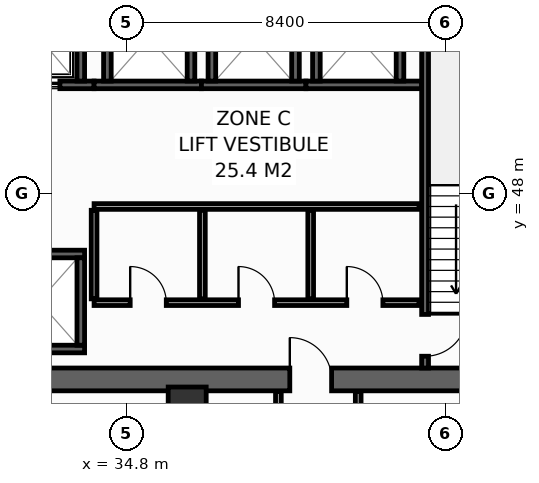
"""IFC4 building model, lengths in metres.
Left out: names, types, materials, properties, quantities, classifications, styles, units other than length and angle.
Written with IfcOpenShell. Run it as: python <this file> out.ifc"""

import sys

from ifc_helpers import new_model, si_unit, direction, frame, frame_2d, origin, origin_2d, place, context, subcontext, project, spatial, rectangle, hollow_rectangle, extrude, element, fill, save


model = new_model("IFC4")
c1 = context("Model", 3, precision=1e-05, world=origin(), true_north=direction((0.0, 1.0)))
c2 = subcontext(c1, "Body", "Model", "MODEL_VIEW")
j1 = project(units=[si_unit("LENGTHUNIT", "METRE"), si_unit("PLANEANGLEUNIT", "RADIAN")], contexts=[c1])
p1 = place(None, origin())
s1 = spatial("IfcSite", under=j1, at=p1, CompositionType="ELEMENT")
p2 = place(p1, origin())
s2 = spatial("IfcBuilding", under=s1, at=p2, CompositionType="ELEMENT")
p3 = place(p2, frame((0.0, 0.0, 106.0)))
s3 = spatial("IfcBuildingStorey", under=s2, at=p3, CompositionType="ELEMENT", Elevation=106.0)
p4 = place(p3, frame((13.5, 43.1, 0.0), z_axis=(0.0, 0.0, 1.0), x_axis=(1.0, 0.0, 0.0)))
e1 = element("IfcWall", 1, at=p4, inside=s3, PredefinedType="SHEAR", context=c2, shape_type="SweptSolid", body=[
    extrude(rectangle(XDim=32.9, YDim=0.6, at=frame_2d((16.45, 0.0))), origin(), (0.0, 0.0, 1.0), 4.15),
])
p5 = place(p4, frame((5.4, 0.0, 0.0)))
e2 = element("IfcOpeningElement", 2, at=p5, cuts=e1, PredefinedType="OPENING", context=c2, shape_type="SweptSolid", body=[
    extrude(rectangle(XDim=1.1, YDim=2.15, at=frame_2d((0.55, 1.075))), frame((0.0, 0.31, 0.0), z_axis=(0.0, -1.0, 0.0), x_axis=(1.0, 0.0, 0.0)), (0.0, 0.0, 1.0), 0.62),
])
p6 = place(p4, frame((25.6, 0.0, 0.0)))
e3 = element("IfcOpeningElement", 3, at=p6, cuts=e1, PredefinedType="OPENING", context=c2, shape_type="SweptSolid", body=[
    extrude(rectangle(XDim=1.1, YDim=2.15, at=frame_2d((0.55, 1.075))), frame((0.0, 0.31, 0.0), z_axis=(0.0, -1.0, 0.0), x_axis=(1.0, 0.0, 0.0)), (0.0, 0.0, 1.0), 0.62),
])
p7 = place(p3, frame((36.4, 42.4, 0.0), z_axis=(0.0, 0.0, 1.0), x_axis=(1.0, 0.0, 0.0)))
e4 = element("IfcColumn", 4, at=p7, inside=s3, PredefinedType="COLUMN", context=c2, shape_type="SweptSolid", body=[
    extrude(hollow_rectangle(XDim=1.0, YDim=1.0, WallThickness=0.045, at=origin_2d()), origin(), (0.0, 0.0, 1.0), 4.4),
])
p8 = place(p3, frame((31.125, 50.85, 0.0), z_axis=(0.0, 0.0, 1.0), x_axis=(1.0, 0.0, 0.0)))
e5 = element("IfcWall", 5, at=p8, inside=s3, PredefinedType="SHEAR", context=c2, shape_type="SweptSolid", body=[
    extrude(rectangle(XDim=2.825, YDim=0.2, at=frame_2d((1.413, 0.0))), origin(), (0.0, 0.0, 1.0), 4.15),
])
p9 = place(p8, frame((0.825, 0.0, 0.0)))
e6 = element("IfcOpeningElement", 6, at=p9, cuts=e5, PredefinedType="OPENING", context=c2, shape_type="SweptSolid", body=[
    extrude(rectangle(XDim=1.1, YDim=2.2, at=frame_2d((0.55, 1.1))), frame((0.0, 0.11, 0.0), z_axis=(0.0, -1.0, 0.0), x_axis=(1.0, 0.0, 0.0)), (0.0, 0.0, 1.0), 0.22),
])
p10 = place(p3, frame((33.6, 50.95, 0.0), z_axis=(0.0, 0.0, 1.0), x_axis=(0.0, 1.0, 0.0)))
e7 = element("IfcWall", 7, at=p10, inside=s3, PredefinedType="SHEAR", context=c2, shape_type="SweptSolid", body=[
    extrude(rectangle(XDim=2.3, YDim=0.2, at=frame_2d((1.15, 0.0))), origin(), (0.0, 0.0, 1.0), 4.15),
])
for number, where, z_axis, x_axis in (
    (8, (31.125, 43.9, 0.0), (0.0, 0.0, 1.0), (1.0, 0.0, 0.0)),
    (9, (31.125, 46.4, 0.0), (0.0, 0.0, 1.0), (1.0, 0.0, 0.0)),
):
    element("IfcWall", number, at=place(p3, frame(where, z_axis=z_axis, x_axis=x_axis)), inside=s3, PredefinedType="SHEAR", context=c2, shape_type="SweptSolid", body=[
        extrude(rectangle(XDim=2.575, YDim=0.2, at=frame_2d((1.288, 0.0))), origin(), (0.0, 0.0, 1.0), 4.15),
    ])
p11 = place(p3, frame((33.6, 44.0, 0.0), z_axis=(0.0, 0.0, 1.0), x_axis=(0.0, 1.0, 0.0)))
e10 = element("IfcWall", 10, at=p11, inside=s3, PredefinedType="SHEAR", context=c2, shape_type="SweptSolid", body=[
    extrude(rectangle(XDim=2.3, YDim=0.2, at=frame_2d((1.15, 0.0))), origin(), (0.0, 0.0, 1.0), 4.15),
])
p12 = place(p3, frame((33.95, 50.85, 0.0), z_axis=(0.0, 0.0, 1.0), x_axis=(1.0, 0.0, 0.0)))
e11 = element("IfcWall", 11, at=p12, inside=s3, PredefinedType="SHEAR", context=c2, shape_type="SweptSolid", body=[
    extrude(rectangle(XDim=2.825, YDim=0.2, at=frame_2d((1.413, 0.0))), origin(), (0.0, 0.0, 1.0), 4.15),
])
for number, where, z_axis, x_axis in (
    (12, (34.3, 50.95, 0.0), (0.0, 0.0, 1.0), (0.0, 1.0, 0.0)),
    (13, (36.5, 50.95, 0.0), (0.0, 0.0, 1.0), (0.0, 1.0, 0.0)),
):
    element("IfcWall", number, at=place(p3, frame(where, z_axis=z_axis, x_axis=x_axis)), inside=s3, PredefinedType="SHEAR", context=c2, shape_type="SweptSolid", body=[
        extrude(rectangle(XDim=2.3, YDim=0.2, at=frame_2d((1.15, 0.0))), origin(), (0.0, 0.0, 1.0), 4.15),
    ])
p13 = place(p3, frame((36.775, 50.85, 0.0), z_axis=(0.0, 0.0, 1.0), x_axis=(1.0, 0.0, 0.0)))
e14 = element("IfcWall", 14, at=p13, inside=s3, PredefinedType="SHEAR", context=c2, shape_type="SweptSolid", body=[
    extrude(rectangle(XDim=2.75, YDim=0.2, at=frame_2d((1.375, 0.0))), origin(), (0.0, 0.0, 1.0), 4.15),
])
for number, where, z_axis, x_axis in (
    (15, (37.05, 50.95, 0.0), (0.0, 0.0, 1.0), (0.0, 1.0, 0.0)),
    (16, (39.25, 50.95, 0.0), (0.0, 0.0, 1.0), (0.0, 1.0, 0.0)),
):
    element("IfcWall", number, at=place(p3, frame(where, z_axis=z_axis, x_axis=x_axis)), inside=s3, PredefinedType="SHEAR", context=c2, shape_type="SweptSolid", body=[
        extrude(rectangle(XDim=2.3, YDim=0.2, at=frame_2d((1.15, 0.0))), origin(), (0.0, 0.0, 1.0), 4.15),
    ])
p14 = place(p3, frame((39.525, 50.85, 0.0), z_axis=(0.0, 0.0, 1.0), x_axis=(1.0, 0.0, 0.0)))
e17 = element("IfcWall", 17, at=p14, inside=s3, PredefinedType="SHEAR", context=c2, shape_type="SweptSolid", body=[
    extrude(rectangle(XDim=3.045, YDim=0.2, at=frame_2d((1.522, 0.0))), origin(), (0.0, 0.0, 1.0), 4.15),
])
for number, where, z_axis, x_axis in (
    (18, (39.8, 50.95, 0.0), (0.0, 0.0, 1.0), (0.0, 1.0, 0.0)),
    (19, (42.0, 50.95, 0.0), (0.0, 0.0, 1.0), (0.0, 1.0, 0.0)),
):
    element("IfcWall", number, at=place(p3, frame(where, z_axis=z_axis, x_axis=x_axis)), inside=s3, PredefinedType="SHEAR", context=c2, shape_type="SweptSolid", body=[
        extrude(rectangle(XDim=2.3, YDim=0.2, at=frame_2d((1.15, 0.0))), origin(), (0.0, 0.0, 1.0), 4.15),
    ])
p15 = place(p3, frame((42.66, 53.8, 0.0), z_axis=(0.0, 0.0, 1.0), x_axis=(0.0, -1.0, 0.0)))
e20 = element("IfcWall", 20, at=p15, inside=s3, PredefinedType="SHEAR", context=c2, shape_type="SweptSolid", body=[
    extrude(rectangle(XDim=10.4, YDim=0.18, at=frame_2d((5.2, 0.0))), origin(), (0.0, 0.0, 1.0), 4.15),
])
p16 = place(p15, frame((8.99, 0.0, 0.0)))
e21 = element("IfcOpeningElement", 21, at=p16, cuts=e20, PredefinedType="OPENING", context=c2, shape_type="SweptSolid", body=[
    extrude(rectangle(XDim=1.1, YDim=2.15, at=frame_2d((0.55, 1.075))), frame((0.0, 0.1, 0.0), z_axis=(0.0, -1.0, 0.0), x_axis=(1.0, 0.0, 0.0)), (0.0, 0.0, 1.0), 0.2),
])
p17 = place(p3, frame((33.95, 45.12, 0.0), z_axis=(0.0, 0.0, 1.0), x_axis=(1.0, 0.0, 0.0)))
e22 = element("IfcWall", 22, at=p17, inside=s3, PredefinedType="PARTITIONING", context=c2, shape_type="SweptSolid", body=[
    extrude(rectangle(XDim=8.55, YDim=0.15, at=frame_2d((4.275, 0.0))), origin(), (0.0, 0.0, 1.0), 4.15),
])
p18 = place(p17, frame((0.95, 0.0, 0.0)))
e23 = element("IfcOpeningElement", 23, at=p18, cuts=e22, PredefinedType="OPENING", context=c2, shape_type="SweptSolid", body=[
    extrude(rectangle(XDim=0.95, YDim=2.15, at=frame_2d((0.475, 1.075))), frame((0.0, 0.085, 0.0), z_axis=(0.0, -1.0, 0.0), x_axis=(1.0, 0.0, 0.0)), (0.0, 0.0, 1.0), 0.17),
])
p19 = place(p17, frame((3.8, 0.0, 0.0)))
e24 = element("IfcOpeningElement", 24, at=p19, cuts=e22, PredefinedType="OPENING", context=c2, shape_type="SweptSolid", body=[
    extrude(rectangle(XDim=0.95, YDim=2.15, at=frame_2d((0.475, 1.075))), frame((0.0, 0.085, 0.0), z_axis=(0.0, -1.0, 0.0), x_axis=(1.0, 0.0, 0.0)), (0.0, 0.0, 1.0), 0.17),
])
p20 = place(p17, frame((6.65, 0.0, 0.0)))
e25 = element("IfcOpeningElement", 25, at=p20, cuts=e22, PredefinedType="OPENING", context=c2, shape_type="SweptSolid", body=[
    extrude(rectangle(XDim=0.95, YDim=2.15, at=frame_2d((0.475, 1.075))), frame((0.0, 0.085, 0.0), z_axis=(0.0, -1.0, 0.0), x_axis=(1.0, 0.0, 0.0)), (0.0, 0.0, 1.0), 0.17),
])
p21 = place(p3, frame((33.95, 47.65, 0.0), z_axis=(0.0, 0.0, 1.0), x_axis=(1.0, 0.0, 0.0)))
e26 = element("IfcWall", 26, at=p21, inside=s3, PredefinedType="PARTITIONING", context=c2, shape_type="SweptSolid", body=[
    extrude(rectangle(XDim=8.55, YDim=0.15, at=frame_2d((4.275, 0.0))), origin(), (0.0, 0.0, 1.0), 4.15),
])
for number, where, z_axis, x_axis in (
    (27, (33.95, 45.22, 0.0), (0.0, 0.0, 1.0), (0.0, 1.0, 0.0)),
    (28, (36.8, 45.22, 0.0), (0.0, 0.0, 1.0), (0.0, 1.0, 0.0)),
    (29, (39.65, 45.22, 0.0), (0.0, 0.0, 1.0), (0.0, 1.0, 0.0)),
):
    element("IfcWall", number, at=place(p3, frame(where, z_axis=z_axis, x_axis=x_axis)), inside=s3, PredefinedType="PARTITIONING", context=c2, shape_type="SweptSolid", body=[
        extrude(rectangle(XDim=2.33, YDim=0.15, at=frame_2d((1.165, 0.0))), origin(), (0.0, 0.0, 1.0), 4.15),
    ])
for number, where, z_axis, x_axis in (
    (30, (38.8, 41.15, 0.0), (0.0, 0.0, 1.0), (0.0, 1.0, 0.0)),
    (31, (40.9, 41.15, 0.0), (0.0, 0.0, 1.0), (0.0, 1.0, 0.0)),
):
    element("IfcWall", number, at=place(p3, frame(where, z_axis=z_axis, x_axis=x_axis)), inside=s3, PredefinedType="PARTITIONING", context=c2, shape_type="SweptSolid", body=[
        extrude(rectangle(XDim=1.63, YDim=0.15, at=frame_2d((0.815, 0.0))), origin(), (0.0, 0.0, 1.0), 4.15),
    ])
p22 = place(p9, origin())
e32 = element("IfcDoor", 32, at=p22, inside=s3, OperationType="SLIDING_TO_LEFT", PredefinedType="DOOR", context=c2, shape_type="SweptSolid", body=[
    extrude(rectangle(XDim=1.1, YDim=2.2, at=frame_2d((0.55, 1.1))), frame((0.0, 0.025, 0.0), z_axis=(0.0, -1.0, 0.0), x_axis=(1.0, 0.0, 0.0)), (0.0, 0.0, 1.0), 0.05),
])
fill(e6, e32)
p23 = place(p16, origin())
e33 = element("IfcDoor", 33, at=p23, inside=s3, OperationType="SINGLE_SWING_LEFT", PredefinedType="DOOR", context=c2, shape_type="SweptSolid", body=[
    extrude(rectangle(XDim=1.1, YDim=2.15, at=frame_2d((0.55, 1.075))), frame((0.0, 0.025, 0.0), z_axis=(0.0, -1.0, 0.0), x_axis=(1.0, 0.0, 0.0)), (0.0, 0.0, 1.0), 0.05),
])
fill(e21, e33)
p24 = place(p6, origin())
e34 = element("IfcDoor", 34, at=p24, inside=s3, OperationType="SINGLE_SWING_LEFT", PredefinedType="DOOR", context=c2, shape_type="SweptSolid", body=[
    extrude(rectangle(XDim=1.1, YDim=2.15, at=frame_2d((0.55, 1.075))), frame((0.0, 0.025, 0.0), z_axis=(0.0, -1.0, 0.0), x_axis=(1.0, 0.0, 0.0)), (0.0, 0.0, 1.0), 0.05),
])
fill(e3, e34)
p25 = place(p18, origin())
e35 = element("IfcDoor", 35, at=p25, inside=s3, OperationType="SINGLE_SWING_LEFT", PredefinedType="DOOR", context=c2, shape_type="SweptSolid", body=[
    extrude(rectangle(XDim=0.95, YDim=2.15, at=frame_2d((0.475, 1.075))), frame((0.0, 0.025, 0.0), z_axis=(0.0, -1.0, 0.0), x_axis=(1.0, 0.0, 0.0)), (0.0, 0.0, 1.0), 0.05),
])
fill(e23, e35)
p26 = place(p19, origin())
e36 = element("IfcDoor", 36, at=p26, inside=s3, OperationType="SINGLE_SWING_LEFT", PredefinedType="DOOR", context=c2, shape_type="SweptSolid", body=[
    extrude(rectangle(XDim=0.95, YDim=2.15, at=frame_2d((0.475, 1.075))), frame((0.0, 0.025, 0.0), z_axis=(0.0, -1.0, 0.0), x_axis=(1.0, 0.0, 0.0)), (0.0, 0.0, 1.0), 0.05),
])
fill(e24, e36)
p27 = place(p20, origin())
e37 = element("IfcDoor", 37, at=p27, inside=s3, OperationType="SINGLE_SWING_LEFT", PredefinedType="DOOR", context=c2, shape_type="SweptSolid", body=[
    extrude(rectangle(XDim=0.95, YDim=2.15, at=frame_2d((0.475, 1.075))), frame((0.0, 0.025, 0.0), z_axis=(0.0, -1.0, 0.0), x_axis=(1.0, 0.0, 0.0)), (0.0, 0.0, 1.0), 0.05),
])
fill(e25, e37)
save(model, sys.argv[1])
